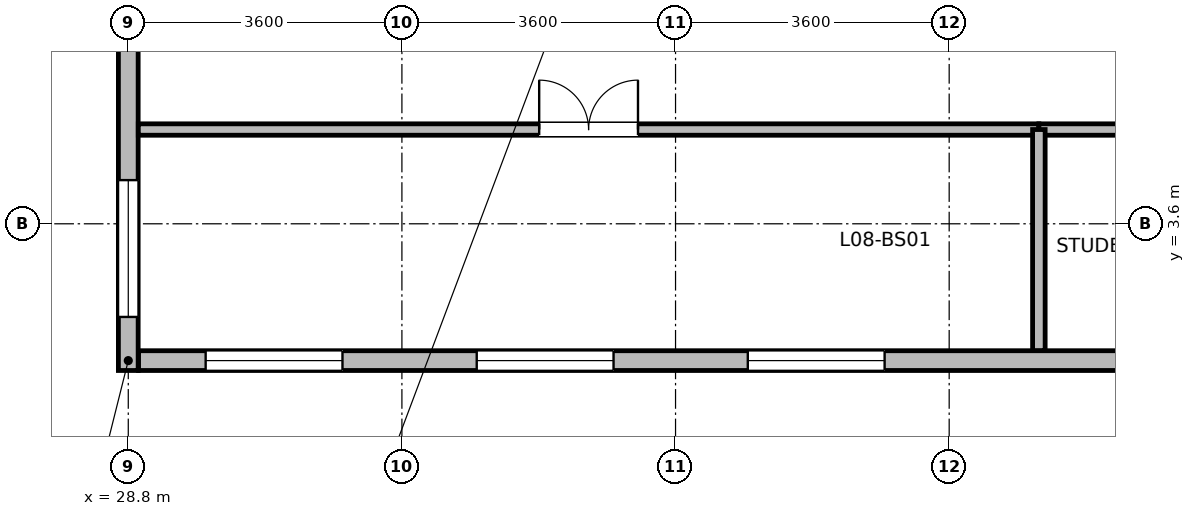
"""IFC4 building model, lengths in metres.
Left out: names, types, materials, properties, quantities, classifications, styles, units other than length and angle.
Written with IfcOpenShell. Run it as: python <this file> out.ifc"""

import sys

from ifc_helpers import new_model, si_unit, direction, frame, frame_2d, origin, place, context, subcontext, project, spatial, rectangle, extrude, element, fill, save


model = new_model("IFC4")
c1 = context("Model", 3, precision=1e-05, world=origin(), true_north=direction((0.0, 1.0)))
c2 = subcontext(c1, "Body", "Model", "MODEL_VIEW")
j1 = project(units=[si_unit("LENGTHUNIT", "METRE"), si_unit("PLANEANGLEUNIT", "RADIAN")], contexts=[c1])
p1 = place(None, origin())
s1 = spatial("IfcSite", under=j1, at=p1, CompositionType="ELEMENT")
p2 = place(p1, origin())
s2 = spatial("IfcBuilding", under=s1, at=p2, CompositionType="ELEMENT")
p3 = place(p2, frame((0.0, 0.0, 36.4)))
s3 = spatial("IfcBuildingStorey", under=s2, at=p3, CompositionType="ELEMENT", Elevation=36.4)
p4 = place(p3, frame((57.465, 1.8, 0.0), z_axis=(0.0, 0.0, 1.0), x_axis=(-1.0, 0.0, 0.0)))
e1 = element("IfcWall", 1, at=p4, inside=s3, PredefinedType="STANDARD", context=c2, shape_type="SweptSolid", body=[
    extrude(rectangle(XDim=28.53, YDim=0.26, at=frame_2d((14.265, 0.0))), origin(), (0.0, 0.0, 1.0), 3.43),
])
p5 = place(p4, frame((0.883, 0.0, 0.85)))
e2 = element("IfcOpeningElement", 2, at=p5, cuts=e1, PredefinedType="OPENING", context=c2, shape_type="SweptSolid", body=[
    extrude(rectangle(XDim=1.8, YDim=1.85, at=frame_2d((0.9, 0.925))), frame((0.0, 0.14, 0.0), z_axis=(0.0, -1.0, 0.0), x_axis=(1.0, 0.0, 0.0)), (0.0, 0.0, 1.0), 0.28),
])
p6 = place(p4, frame((4.449, 0.0, 0.85)))
e3 = element("IfcOpeningElement", 3, at=p6, cuts=e1, PredefinedType="OPENING", context=c2, shape_type="SweptSolid", body=[
    extrude(rectangle(XDim=1.8, YDim=1.85, at=frame_2d((0.9, 0.925))), frame((0.0, 0.14, 0.0), z_axis=(0.0, -1.0, 0.0), x_axis=(1.0, 0.0, 0.0)), (0.0, 0.0, 1.0), 0.28),
])
p7 = place(p4, frame((11.582, 0.0, 0.85)))
e4 = element("IfcOpeningElement", 4, at=p7, cuts=e1, PredefinedType="OPENING", context=c2, shape_type="SweptSolid", body=[
    extrude(rectangle(XDim=1.8, YDim=1.85, at=frame_2d((0.9, 0.925))), frame((0.0, 0.14, 0.0), z_axis=(0.0, -1.0, 0.0), x_axis=(1.0, 0.0, 0.0)), (0.0, 0.0, 1.0), 0.28),
])
p8 = place(p4, frame((18.714, 0.0, 0.85)))
e5 = element("IfcOpeningElement", 5, at=p8, cuts=e1, PredefinedType="OPENING", context=c2, shape_type="SweptSolid", body=[
    extrude(rectangle(XDim=1.8, YDim=1.85, at=frame_2d((0.9, 0.925))), frame((0.0, 0.14, 0.0), z_axis=(0.0, -1.0, 0.0), x_axis=(1.0, 0.0, 0.0)), (0.0, 0.0, 1.0), 0.28),
])
p9 = place(p4, frame((22.281, 0.0, 0.85)))
e6 = element("IfcOpeningElement", 6, at=p9, cuts=e1, PredefinedType="OPENING", context=c2, shape_type="SweptSolid", body=[
    extrude(rectangle(XDim=1.8, YDim=1.85, at=frame_2d((0.9, 0.925))), frame((0.0, 0.14, 0.0), z_axis=(0.0, -1.0, 0.0), x_axis=(1.0, 0.0, 0.0)), (0.0, 0.0, 1.0), 0.28),
])
p10 = place(p4, frame((25.847, 0.0, 0.85)))
e7 = element("IfcOpeningElement", 7, at=p10, cuts=e1, PredefinedType="OPENING", context=c2, shape_type="SweptSolid", body=[
    extrude(rectangle(XDim=1.8, YDim=1.85, at=frame_2d((0.9, 0.925))), frame((0.0, 0.14, 0.0), z_axis=(0.0, -1.0, 0.0), x_axis=(1.0, 0.0, 0.0)), (0.0, 0.0, 1.0), 0.28),
])
p11 = place(p3, frame((28.8, 1.67, 0.0), z_axis=(0.0, 0.0, 1.0), x_axis=(0.0, 1.0, 0.0)))
e8 = element("IfcWall", 8, at=p11, inside=s3, PredefinedType="STANDARD", context=c2, shape_type="SweptSolid", body=[
    extrude(rectangle(XDim=19.254, YDim=0.26, at=frame_2d((9.627, 0.0))), origin(), (0.0, 0.0, 1.0), 3.43),
])
p12 = place(p11, frame((0.705, 0.0, 0.85)))
e9 = element("IfcOpeningElement", 9, at=p12, cuts=e8, PredefinedType="OPENING", context=c2, shape_type="SweptSolid", body=[
    extrude(rectangle(XDim=1.8, YDim=1.85, at=frame_2d((0.9, 0.925))), frame((0.0, 0.14, 0.0), z_axis=(0.0, -1.0, 0.0), x_axis=(1.0, 0.0, 0.0)), (0.0, 0.0, 1.0), 0.28),
])
p13 = place(p11, frame((7.123, 0.0, 0.85)))
e10 = element("IfcOpeningElement", 10, at=p13, cuts=e8, PredefinedType="OPENING", context=c2, shape_type="SweptSolid", body=[
    extrude(rectangle(XDim=1.8, YDim=1.85, at=frame_2d((0.9, 0.925))), frame((0.0, 0.14, 0.0), z_axis=(0.0, -1.0, 0.0), x_axis=(1.0, 0.0, 0.0)), (0.0, 0.0, 1.0), 0.28),
])
p14 = place(p11, frame((10.332, 0.0, 0.85)))
e11 = element("IfcOpeningElement", 11, at=p14, cuts=e8, PredefinedType="OPENING", context=c2, shape_type="SweptSolid", body=[
    extrude(rectangle(XDim=1.8, YDim=1.85, at=frame_2d((0.9, 0.925))), frame((0.0, 0.14, 0.0), z_axis=(0.0, -1.0, 0.0), x_axis=(1.0, 0.0, 0.0)), (0.0, 0.0, 1.0), 0.28),
])
p15 = place(p11, frame((13.541, 0.0, 0.85)))
e12 = element("IfcOpeningElement", 12, at=p15, cuts=e8, PredefinedType="OPENING", context=c2, shape_type="SweptSolid", body=[
    extrude(rectangle(XDim=1.8, YDim=1.85, at=frame_2d((0.9, 0.925))), frame((0.0, 0.14, 0.0), z_axis=(0.0, -1.0, 0.0), x_axis=(1.0, 0.0, 0.0)), (0.0, 0.0, 1.0), 0.28),
])
p16 = place(p11, frame((16.75, 0.0, 0.85)))
e13 = element("IfcOpeningElement", 13, at=p16, cuts=e8, PredefinedType="OPENING", context=c2, shape_type="SweptSolid", body=[
    extrude(rectangle(XDim=1.8, YDim=1.85, at=frame_2d((0.9, 0.925))), frame((0.0, 0.14, 0.0), z_axis=(0.0, -1.0, 0.0), x_axis=(1.0, 0.0, 0.0)), (0.0, 0.0, 1.0), 0.28),
])
p17 = place(p3, frame((28.932, 4.84, 0.0), z_axis=(0.0, 0.0, 1.0), x_axis=(1.0, 0.0, 0.0)))
e14 = element("IfcWall", 14, at=p17, inside=s3, PredefinedType="PARTITIONING", context=c2, shape_type="SweptSolid", body=[
    extrude(rectangle(XDim=11.848, YDim=0.15, at=frame_2d((5.924, 0.0))), origin(), (0.0, 0.0, 1.0), 3.43),
])
p18 = place(p17, frame((5.274, 0.0, 0.0)))
e15 = element("IfcOpeningElement", 15, at=p18, cuts=e14, PredefinedType="OPENING", context=c2, shape_type="SweptSolid", body=[
    extrude(rectangle(XDim=1.3, YDim=2.12, at=frame_2d((0.65, 1.06))), frame((0.0, 0.085, 0.0), z_axis=(0.0, -1.0, 0.0), x_axis=(1.0, 0.0, 0.0)), (0.0, 0.0, 1.0), 0.17),
])
p19 = place(p3, frame((40.78, 4.84, 0.0), z_axis=(0.0, 0.0, 1.0), x_axis=(1.0, 0.0, 0.0)))
e16 = element("IfcWall", 16, at=p19, inside=s3, PredefinedType="PARTITIONING", context=c2, shape_type="SweptSolid", body=[
    extrude(rectangle(XDim=8.12, YDim=0.15, at=frame_2d((4.06, 0.0))), origin(), (0.0, 0.0, 1.0), 3.43),
])
p20 = place(p19, frame((3.585, 0.0, 0.0)))
e17 = element("IfcOpeningElement", 17, at=p20, cuts=e16, PredefinedType="OPENING", context=c2, shape_type="SweptSolid", body=[
    extrude(rectangle(XDim=0.95, YDim=2.1, at=frame_2d((0.475, 1.05))), frame((0.0, 0.085, 0.0), z_axis=(0.0, -1.0, 0.0), x_axis=(1.0, 0.0, 0.0)), (0.0, 0.0, 1.0), 0.17),
])
p21 = place(p3, frame((40.78, 1.932, 0.0), z_axis=(0.0, 0.0, 1.0), x_axis=(0.0, 1.0, 0.0)))
e18 = element("IfcWall", 18, at=p21, inside=s3, PredefinedType="PARTITIONING", context=c2, shape_type="SweptSolid", body=[
    extrude(rectangle(XDim=2.908, YDim=0.165, at=frame_2d((1.454, 0.0))), origin(), (0.0, 0.0, 1.0), 3.43),
])
p22 = place(p8, origin())
e19 = element("IfcWindow", 19, at=p22, inside=s3, PartitioningType="SINGLE_PANEL", PredefinedType="WINDOW", context=c2, shape_type="SweptSolid", body=[
    extrude(rectangle(XDim=1.8, YDim=1.85, at=frame_2d((0.9, 0.925))), frame((0.0, 0.03, 0.0), z_axis=(0.0, -1.0, 0.0), x_axis=(1.0, 0.0, 0.0)), (0.0, 0.0, 1.0), 0.06),
])
fill(e5, e19)
p23 = place(p9, origin())
e20 = element("IfcWindow", 20, at=p23, inside=s3, PartitioningType="SINGLE_PANEL", PredefinedType="WINDOW", context=c2, shape_type="SweptSolid", body=[
    extrude(rectangle(XDim=1.8, YDim=1.85, at=frame_2d((0.9, 0.925))), frame((0.0, 0.03, 0.0), z_axis=(0.0, -1.0, 0.0), x_axis=(1.0, 0.0, 0.0)), (0.0, 0.0, 1.0), 0.06),
])
fill(e6, e20)
p24 = place(p10, origin())
e21 = element("IfcWindow", 21, at=p24, inside=s3, PartitioningType="SINGLE_PANEL", PredefinedType="WINDOW", context=c2, shape_type="SweptSolid", body=[
    extrude(rectangle(XDim=1.8, YDim=1.85, at=frame_2d((0.9, 0.925))), frame((0.0, 0.03, 0.0), z_axis=(0.0, -1.0, 0.0), x_axis=(1.0, 0.0, 0.0)), (0.0, 0.0, 1.0), 0.06),
])
fill(e7, e21)
p25 = place(p12, origin())
e22 = element("IfcWindow", 22, at=p25, inside=s3, PartitioningType="SINGLE_PANEL", PredefinedType="WINDOW", context=c2, shape_type="SweptSolid", body=[
    extrude(rectangle(XDim=1.8, YDim=1.85, at=frame_2d((0.9, 0.925))), frame((0.0, 0.03, 0.0), z_axis=(0.0, -1.0, 0.0), x_axis=(1.0, 0.0, 0.0)), (0.0, 0.0, 1.0), 0.06),
])
fill(e9, e22)
p26 = place(p18, origin())
e23 = element("IfcDoor", 23, at=p26, inside=s3, OperationType="DOUBLE_DOOR_SINGLE_SWING", PredefinedType="DOOR", context=c2, shape_type="SweptSolid", body=[
    extrude(rectangle(XDim=1.3, YDim=2.12, at=frame_2d((0.65, 1.06))), frame((0.0, 0.025, 0.0), z_axis=(0.0, -1.0, 0.0), x_axis=(1.0, 0.0, 0.0)), (0.0, 0.0, 1.0), 0.05),
])
fill(e15, e23)
save(model, sys.argv[1])
